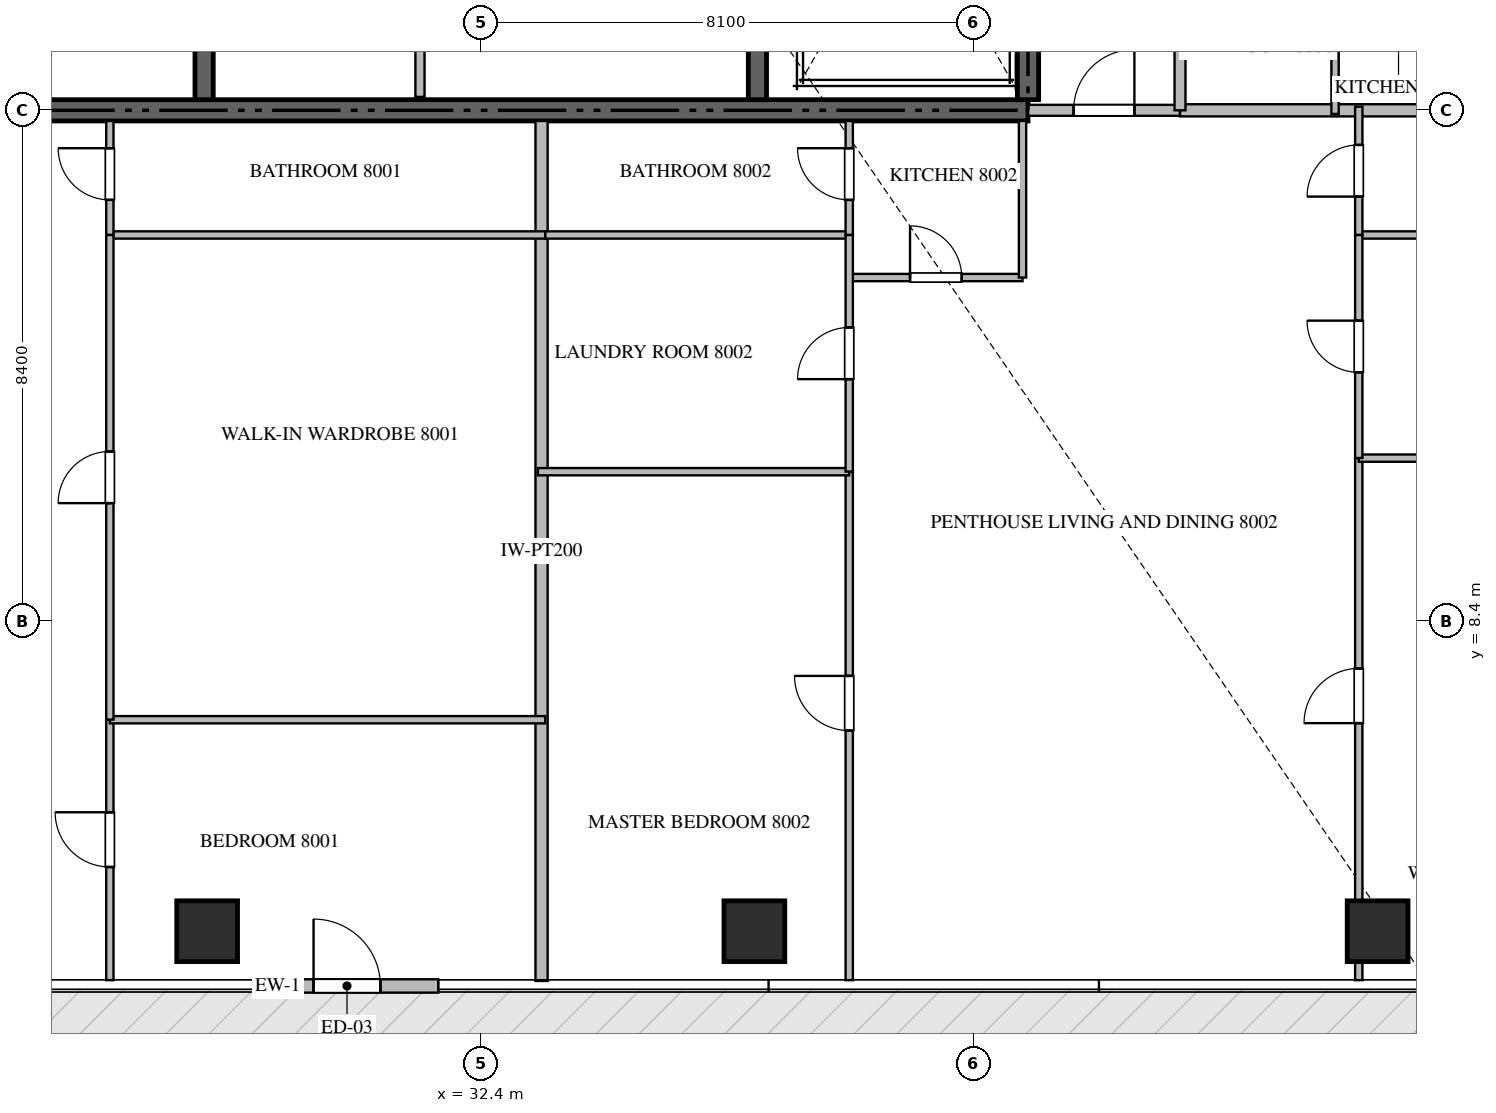
"""IFC4 building model, lengths in metres.
Left out: names, types, materials, properties, quantities, classifications, styles, units other than length and angle.
Written with IfcOpenShell. Run it as: python <this file> out.ifc"""

import sys

from ifc_helpers import new_model, si_unit, direction, frame, frame_2d, origin, origin_2d, place, context, subcontext, project, spatial, rectangle, extrude, source, transform, mapped, element, fill, save


model = new_model("IFC4")
c1 = context("Model", 3, precision=1e-05, world=origin(), true_north=direction((0.0, 1.0)))
c2 = subcontext(c1, "Body", "Model", "MODEL_VIEW")
j1 = project(units=[si_unit("LENGTHUNIT", "METRE"), si_unit("PLANEANGLEUNIT", "RADIAN")], contexts=[c1])
p1 = place(None, origin())
s1 = spatial("IfcSite", under=j1, at=p1, CompositionType="ELEMENT")
p2 = place(p1, origin())
s2 = spatial("IfcBuilding", under=s1, at=p2, CompositionType="ELEMENT")
p3 = place(p2, frame((0.0, 0.0, 321.8)))
s3 = spatial("IfcBuildingStorey", under=s2, at=p3, CompositionType="ELEMENT", Elevation=321.8)
p4 = place(p3, frame((23.4, 16.8, -0.26), z_axis=(0.0, 0.0, 1.0), x_axis=(1.0, 0.0, 0.0)))
e1 = element("IfcWall", 1, at=p4, inside=s3, PredefinedType="SHEAR", context=c2, shape_type="SweptSolid", body=[
    extrude(rectangle(XDim=18.0, YDim=0.35, at=frame_2d((9.0, 0.0))), origin(), (0.0, 0.0, 1.0), 4.048),
])
p5 = place(p3, frame((41.4, 16.975, -0.26), z_axis=(0.0, 0.0, 1.0), x_axis=(0.0, 1.0, 0.0)))
e2 = element("IfcWall", 2, at=p5, inside=s3, PredefinedType="SHEAR", context=c2, shape_type="SweptSolid", body=[
    extrude(rectangle(XDim=8.375, YDim=0.35, at=frame_2d((4.188, 0.0))), origin(), (0.0, 0.0, 1.0), 4.048),
])
p6 = place(p3, frame((27.85, 16.975, -0.26), z_axis=(0.0, 0.0, 1.0), x_axis=(0.0, 1.0, 0.0)))
e3 = element("IfcWall", 3, at=p6, inside=s3, PredefinedType="SHEAR", context=c2, shape_type="SweptSolid", body=[
    extrude(rectangle(XDim=4.875, YDim=0.3, at=frame_2d((2.438, 0.0))), origin(), (0.0, 0.0, 1.0), 4.048),
])
p7 = place(p3, frame((36.95, 16.975, -0.26), z_axis=(0.0, 0.0, 1.0), x_axis=(0.0, 1.0, 0.0)))
e4 = element("IfcWall", 4, at=p7, inside=s3, PredefinedType="SHEAR", context=c2, shape_type="SweptSolid", body=[
    extrude(rectangle(XDim=8.375, YDim=0.3, at=frame_2d((4.188, 0.0))), origin(), (0.0, 0.0, 1.0), 4.048),
])
m1 = source(origin(), c2, "Body", "SweptSolid", [
    extrude(rectangle(XDim=1.0, YDim=1.0, at=origin_2d()), origin(), (0.0, 0.0, 1.0), 4.05),
])
for number, where, z_axis, x_axis in (
    (5, (27.9, 3.3, -0.26), (0.0, 0.0, 1.0), (1.0, 0.0, 0.0)),
    (6, (36.9, 3.3, -0.26), (0.0, 0.0, 1.0), (1.0, 0.0, 0.0)),
    (7, (47.15, 3.3, -0.26), (0.0, 0.0, 1.0), (1.0, 0.0, 0.0)),
):
    element("IfcColumn", number, at=place(p3, frame(where, z_axis=z_axis, x_axis=x_axis)), inside=s3, PredefinedType="COLUMN", context=c2, shape_type="MappedRepresentation", body=[
        mapped(m1, transform((0.0, 0.0, 0.0), scale=1.0)),
    ])
p8 = place(p3, frame((28.7, 2.4, 0.0), z_axis=(0.0, 0.0, 1.0), x_axis=(1.0, 0.0, 0.0)))
e8 = element("IfcWall", 8, at=p8, inside=s3, PredefinedType="ELEMENTEDWALL", context=c2, shape_type="SweptSolid", body=[
    extrude(rectangle(XDim=3.0, YDim=0.22, at=frame_2d((1.5, 0.0))), origin(), (0.0, 0.0, 1.0), 3.775),
])
p9 = place(p8, frame((0.95, 0.0, 0.0)))
e9 = element("IfcOpeningElement", 9, at=p9, cuts=e8, PredefinedType="OPENING", context=c2, shape_type="SweptSolid", body=[
    extrude(rectangle(XDim=1.1, YDim=2.2, at=frame_2d((0.55, 1.1))), frame((0.0, 0.12, 0.0), z_axis=(0.0, -1.0, 0.0), x_axis=(1.0, 0.0, 0.0)), (0.0, 0.0, 1.0), 0.24),
])
p10 = place(p3, frame((31.4, 17.02, 0.0), z_axis=(0.0, 0.0, 1.0), x_axis=(0.0, 1.0, 0.0)))
e10 = element("IfcWall", 10, at=p10, inside=s3, PredefinedType="PARTITIONING", context=c2, shape_type="SweptSolid", body=[
    extrude(rectangle(XDim=2.73, YDim=0.15, at=frame_2d((1.365, 0.0))), origin(), (0.0, 0.0, 1.0), 3.79),
])
p11 = place(p3, frame((33.4, 2.482, 0.0), z_axis=(0.0, 0.0, 1.0), x_axis=(0.0, 1.0, 0.0)))
e11 = element("IfcWall", 11, at=p11, inside=s3, PredefinedType="PARTITIONING", context=c2, shape_type="SweptSolid", body=[
    extrude(rectangle(XDim=14.143, YDim=0.2, at=frame_2d((7.072, 0.0))), origin(), (0.0, 0.0, 1.0), 3.79),
])
p12 = place(p3, frame((43.9, 16.8, 0.0), z_axis=(0.0, 0.0, 1.0), x_axis=(1.0, 0.0, 0.0)))
e12 = element("IfcWall", 12, at=p12, inside=s3, PredefinedType="PARTITIONING", context=c2, shape_type="SweptSolid", body=[
    extrude(rectangle(XDim=11.618, YDim=0.2, at=frame_2d((5.809, 0.0))), origin(), (0.0, 0.0, 1.0), 3.79),
])
p13 = place(p3, frame((41.402, 16.8, 0.0), z_axis=(0.0, 0.0, 1.0), x_axis=(1.0, 0.0, 0.0)))
e13 = element("IfcWall", 13, at=p13, inside=s3, PredefinedType="PARTITIONING", context=c2, shape_type="SweptSolid", body=[
    extrude(rectangle(XDim=2.496, YDim=0.18, at=frame_2d((1.248, 0.0))), origin(), (0.0, 0.0, 1.0), 3.79),
])
p14 = place(p13, frame((0.748, 0.0, 0.0)))
e14 = element("IfcOpeningElement", 14, at=p14, cuts=e13, PredefinedType="OPENING", context=c2, shape_type="SweptSolid", body=[
    extrude(rectangle(XDim=1.0, YDim=2.15, at=frame_2d((0.5, 1.075))), frame((0.0, 0.1, 0.0), z_axis=(0.0, -1.0, 0.0), x_axis=(1.0, 0.0, 0.0)), (0.0, 0.0, 1.0), 0.2),
])
p15 = place(p3, frame((43.9, 16.8, 0.0), z_axis=(0.0, 0.0, 1.0), x_axis=(0.0, 1.0, 0.0)))
e15 = element("IfcWall", 15, at=p15, inside=s3, PredefinedType="PARTITIONING", context=c2, shape_type="SweptSolid", body=[
    extrude(rectangle(XDim=16.8, YDim=0.18, at=frame_2d((8.4, 0.0))), origin(), (0.0, 0.0, 1.0), 3.79),
])
p16 = place(p15, frame((4.803, 0.0, 0.0)))
e16 = element("IfcOpeningElement", 16, at=p16, cuts=e15, PredefinedType="OPENING", context=c2, shape_type="SweptSolid", body=[
    extrude(rectangle(XDim=1.0, YDim=2.15, at=frame_2d((0.5, 1.075))), frame((0.0, 0.1, 0.0), z_axis=(0.0, -1.0, 0.0), x_axis=(1.0, 0.0, 0.0)), (0.0, 0.0, 1.0), 0.2),
])
p17 = place(p15, frame((13.225, 0.0, 0.0)))
e17 = element("IfcOpeningElement", 17, at=p17, cuts=e15, PredefinedType="OPENING", context=c2, shape_type="SweptSolid", body=[
    extrude(rectangle(XDim=1.0, YDim=2.15, at=frame_2d((0.5, 1.075))), frame((0.0, 0.1, 0.0), z_axis=(0.0, -1.0, 0.0), x_axis=(1.0, 0.0, 0.0)), (0.0, 0.0, 1.0), 0.2),
])
p18 = place(p3, frame((26.3, 2.495, 0.0), z_axis=(0.0, 0.0, 1.0), x_axis=(0.0, 1.0, 0.0)))
e18 = element("IfcWall", 18, at=p18, inside=s3, PredefinedType="PARTITIONING", context=c2, shape_type="SweptSolid", body=[
    extrude(rectangle(XDim=4.283, YDim=0.12, at=frame_2d((2.142, 0.0))), origin(), (0.0, 0.0, 1.0), 3.79),
])
p19 = place(p18, frame((1.861, 0.0, 0.0)))
e19 = element("IfcOpeningElement", 19, at=p19, cuts=e18, PredefinedType="OPENING", context=c2, shape_type="SweptSolid", body=[
    extrude(rectangle(XDim=0.9, YDim=2.1, at=frame_2d((0.45, 1.05))), frame((0.0, 0.07, 0.0), z_axis=(0.0, -1.0, 0.0), x_axis=(1.0, 0.0, 0.0)), (0.0, 0.0, 1.0), 0.14),
])
for number, where, z_axis, x_axis in (
    (20, (26.3, 6.778, 0.0), (0.0, 0.0, 1.0), (1.0, 0.0, 0.0)),
    (21, (26.3, 14.75, 0.0), (0.0, 0.0, 1.0), (1.0, 0.0, 0.0)),
):
    element("IfcWall", number, at=place(p3, frame(where, z_axis=z_axis, x_axis=x_axis)), inside=s3, PredefinedType="PARTITIONING", context=c2, shape_type="SweptSolid", body=[
        extrude(rectangle(XDim=7.16, YDim=0.12, at=frame_2d((3.58, 0.0))), origin(), (0.0, 0.0, 1.0), 3.79),
    ])
p20 = place(p3, frame((26.3, 6.78, 0.0), z_axis=(0.0, 0.0, 1.0), x_axis=(0.0, 1.0, 0.0)))
e22 = element("IfcWall", 22, at=p20, inside=s3, PredefinedType="PARTITIONING", context=c2, shape_type="SweptSolid", body=[
    extrude(rectangle(XDim=7.97, YDim=0.12, at=frame_2d((3.985, 0.0))), origin(), (0.0, 0.0, 1.0), 3.79),
])
p21 = place(p20, frame((3.56, 0.0, 0.0)))
e23 = element("IfcOpeningElement", 23, at=p21, cuts=e22, PredefinedType="OPENING", context=c2, shape_type="SweptSolid", body=[
    extrude(rectangle(XDim=0.85, YDim=2.1, at=frame_2d((0.425, 1.05))), frame((0.0, 0.07, 0.0), z_axis=(0.0, -1.0, 0.0), x_axis=(1.0, 0.0, 0.0)), (0.0, 0.0, 1.0), 0.14),
])
p22 = place(p3, frame((26.3, 14.752, 0.0), z_axis=(0.0, 0.0, 1.0), x_axis=(0.0, 1.0, 0.0)))
e24 = element("IfcWall", 24, at=p22, inside=s3, PredefinedType="PARTITIONING", context=c2, shape_type="SweptSolid", body=[
    extrude(rectangle(XDim=1.873, YDim=0.12, at=frame_2d((0.937, 0.0))), origin(), (0.0, 0.0, 1.0), 3.79),
])
p23 = place(p22, frame((0.575, 0.0, 0.0)))
e25 = element("IfcOpeningElement", 25, at=p23, cuts=e24, PredefinedType="OPENING", context=c2, shape_type="SweptSolid", body=[
    extrude(rectangle(XDim=0.85, YDim=2.1, at=frame_2d((0.425, 1.05))), frame((0.0, 0.07, 0.0), z_axis=(0.0, -1.0, 0.0), x_axis=(1.0, 0.0, 0.0)), (0.0, 0.0, 1.0), 0.14),
])
p24 = place(p3, frame((38.46, 14.05, 0.0), z_axis=(0.0, 0.0, 1.0), x_axis=(1.0, 0.0, 0.0)))
e26 = element("IfcWall", 26, at=p24, inside=s3, PredefinedType="PARTITIONING", context=c2, shape_type="SweptSolid", body=[
    extrude(rectangle(XDim=2.85, YDim=0.12, at=frame_2d((1.425, 0.0))), origin(), (0.0, 0.0, 1.0), 3.79),
])
p25 = place(p24, frame((1.0, 0.0, 0.0)))
e27 = element("IfcOpeningElement", 27, at=p25, cuts=e26, PredefinedType="OPENING", context=c2, shape_type="SweptSolid", body=[
    extrude(rectangle(XDim=0.85, YDim=2.1, at=frame_2d((0.425, 1.05))), frame((0.0, 0.07, 0.0), z_axis=(0.0, -1.0, 0.0), x_axis=(1.0, 0.0, 0.0)), (0.0, 0.0, 1.0), 0.14),
])
p26 = place(p3, frame((41.31, 14.05, 0.0), z_axis=(0.0, 0.0, 1.0), x_axis=(0.0, 1.0, 0.0)))
e28 = element("IfcWall", 28, at=p26, inside=s3, PredefinedType="PARTITIONING", context=c2, shape_type="SweptSolid", body=[
    extrude(rectangle(XDim=2.575, YDim=0.12, at=frame_2d((1.288, 0.0))), origin(), (0.0, 0.0, 1.0), 3.79),
])
p27 = place(p3, frame((38.46, 2.495, 0.0), z_axis=(0.0, 0.0, 1.0), x_axis=(0.0, 1.0, 0.0)))
e29 = element("IfcWall", 29, at=p27, inside=s3, PredefinedType="PARTITIONING", context=c2, shape_type="SweptSolid", body=[
    extrude(rectangle(XDim=8.362, YDim=0.12, at=frame_2d((4.181, 0.0))), origin(), (0.0, 0.0, 1.0), 3.79),
])
p28 = place(p27, frame((4.104, 0.0, 0.0)))
e30 = element("IfcOpeningElement", 30, at=p28, cuts=e29, PredefinedType="OPENING", context=c2, shape_type="SweptSolid", body=[
    extrude(rectangle(XDim=0.9, YDim=2.1, at=frame_2d((0.45, 1.05))), frame((0.0, 0.07, 0.0), z_axis=(0.0, -1.0, 0.0), x_axis=(1.0, 0.0, 0.0)), (0.0, 0.0, 1.0), 0.14),
])
p29 = place(p3, frame((33.34, 10.857, 0.0), z_axis=(0.0, 0.0, 1.0), x_axis=(1.0, 0.0, 0.0)))
e31 = element("IfcWall", 31, at=p29, inside=s3, PredefinedType="PARTITIONING", context=c2, shape_type="SweptSolid", body=[
    extrude(rectangle(XDim=5.12, YDim=0.12, at=frame_2d((2.56, 0.0))), origin(), (0.0, 0.0, 1.0), 3.372),
])
p30 = place(p3, frame((33.462, 14.75, 0.0), z_axis=(0.0, 0.0, 1.0), x_axis=(1.0, 0.0, 0.0)))
e32 = element("IfcWall", 32, at=p30, inside=s3, PredefinedType="PARTITIONING", context=c2, shape_type="SweptSolid", body=[
    extrude(rectangle(XDim=4.998, YDim=0.12, at=frame_2d((2.499, 0.0))), origin(), (0.0, 0.0, 1.0), 3.79),
])
p31 = place(p3, frame((38.46, 10.859, 0.0), z_axis=(0.0, 0.0, 1.0), x_axis=(0.0, 1.0, 0.0)))
e33 = element("IfcWall", 33, at=p31, inside=s3, PredefinedType="PARTITIONING", context=c2, shape_type="SweptSolid", body=[
    extrude(rectangle(XDim=3.891, YDim=0.12, at=frame_2d((1.946, 0.0))), origin(), (0.0, 0.0, 1.0), 3.79),
])
p32 = place(p31, frame((1.52, 0.0, 0.0)))
e34 = element("IfcOpeningElement", 34, at=p32, cuts=e33, PredefinedType="OPENING", context=c2, shape_type="SweptSolid", body=[
    extrude(rectangle(XDim=0.85, YDim=2.1, at=frame_2d((0.425, 1.05))), frame((0.0, 0.07, 0.0), z_axis=(0.0, -1.0, 0.0), x_axis=(1.0, 0.0, 0.0)), (0.0, 0.0, 1.0), 0.14),
])
p33 = place(p3, frame((38.46, 14.752, 0.0), z_axis=(0.0, 0.0, 1.0), x_axis=(0.0, 1.0, 0.0)))
e35 = element("IfcWall", 35, at=p33, inside=s3, PredefinedType="PARTITIONING", context=c2, shape_type="SweptSolid", body=[
    extrude(rectangle(XDim=1.873, YDim=0.12, at=frame_2d((0.937, 0.0))), origin(), (0.0, 0.0, 1.0), 3.79),
])
p34 = place(p33, frame((0.575, 0.0, 0.0)))
e36 = element("IfcOpeningElement", 36, at=p34, cuts=e35, PredefinedType="OPENING", context=c2, shape_type="SweptSolid", body=[
    extrude(rectangle(XDim=0.85, YDim=2.1, at=frame_2d((0.425, 1.05))), frame((0.0, 0.07, 0.0), z_axis=(0.0, -1.0, 0.0), x_axis=(1.0, 0.0, 0.0)), (0.0, 0.0, 1.0), 0.14),
])
p35 = place(p3, frame((46.84, 2.495, 0.0), z_axis=(0.0, 0.0, 1.0), x_axis=(0.0, 1.0, 0.0)))
e37 = element("IfcWall", 37, at=p35, inside=s3, PredefinedType="PARTITIONING", context=c2, shape_type="SweptSolid", body=[
    extrude(rectangle(XDim=8.585, YDim=0.12, at=frame_2d((4.292, 0.0))), origin(), (0.0, 0.0, 1.0), 3.79),
])
p36 = place(p35, frame((4.227, 0.0, 0.0)))
e38 = element("IfcOpeningElement", 38, at=p36, cuts=e37, PredefinedType="OPENING", context=c2, shape_type="SweptSolid", body=[
    extrude(rectangle(XDim=0.9, YDim=2.1, at=frame_2d((0.45, 1.05))), frame((0.0, 0.07, 0.0), z_axis=(0.0, -1.0, 0.0), x_axis=(1.0, 0.0, 0.0)), (0.0, 0.0, 1.0), 0.14),
])
p37 = place(p3, frame((46.84, 11.08, 0.0), z_axis=(0.0, 0.0, 1.0), x_axis=(1.0, 0.0, 0.0)))
e39 = element("IfcWall", 39, at=p37, inside=s3, PredefinedType="PARTITIONING", context=c2, shape_type="SweptSolid", body=[
    extrude(rectangle(XDim=8.665, YDim=0.12, at=frame_2d((4.333, 0.0))), origin(), (0.0, 0.0, 1.0), 3.372),
])
p38 = place(p3, frame((46.84, 14.75, 0.0), z_axis=(0.0, 0.0, 1.0), x_axis=(1.0, 0.0, 0.0)))
e40 = element("IfcWall", 40, at=p38, inside=s3, PredefinedType="PARTITIONING", context=c2, shape_type="SweptSolid", body=[
    extrude(rectangle(XDim=8.665, YDim=0.12, at=frame_2d((4.333, 0.0))), origin(), (0.0, 0.0, 1.0), 3.79),
])
p39 = place(p3, frame((46.84, 11.082, 0.0), z_axis=(0.0, 0.0, 1.0), x_axis=(0.0, 1.0, 0.0)))
e41 = element("IfcWall", 41, at=p39, inside=s3, PredefinedType="PARTITIONING", context=c2, shape_type="SweptSolid", body=[
    extrude(rectangle(XDim=3.668, YDim=0.12, at=frame_2d((1.834, 0.0))), origin(), (0.0, 0.0, 1.0), 3.79),
])
p40 = place(p39, frame((1.409, 0.0, 0.0)))
e42 = element("IfcOpeningElement", 42, at=p40, cuts=e41, PredefinedType="OPENING", context=c2, shape_type="SweptSolid", body=[
    extrude(rectangle(XDim=0.85, YDim=2.1, at=frame_2d((0.425, 1.05))), frame((0.0, 0.07, 0.0), z_axis=(0.0, -1.0, 0.0), x_axis=(1.0, 0.0, 0.0)), (0.0, 0.0, 1.0), 0.14),
])
p41 = place(p3, frame((46.84, 14.752, 0.0), z_axis=(0.0, 0.0, 1.0), x_axis=(0.0, 1.0, 0.0)))
e43 = element("IfcWall", 43, at=p41, inside=s3, PredefinedType="PARTITIONING", context=c2, shape_type="SweptSolid", body=[
    extrude(rectangle(XDim=2.108, YDim=0.12, at=frame_2d((1.054, 0.0))), origin(), (0.0, 0.0, 1.0), 3.79),
])
p42 = place(p41, frame((0.629, 0.0, 0.0)))
e44 = element("IfcOpeningElement", 44, at=p42, cuts=e43, PredefinedType="OPENING", context=c2, shape_type="SweptSolid", body=[
    extrude(rectangle(XDim=0.85, YDim=2.1, at=frame_2d((0.425, 1.05))), frame((0.0, 0.07, 0.0), z_axis=(0.0, -1.0, 0.0), x_axis=(1.0, 0.0, 0.0)), (0.0, 0.0, 1.0), 0.14),
])
p43 = place(p3, frame((46.45, 16.74, 0.0), z_axis=(0.0, 0.0, 1.0), x_axis=(0.0, 1.0, 0.0)))
e45 = element("IfcWall", 45, at=p43, inside=s3, PredefinedType="PARTITIONING", context=c2, shape_type="SweptSolid", body=[
    extrude(rectangle(XDim=2.66, YDim=0.12, at=frame_2d((1.33, 0.0))), origin(), (0.0, 0.0, 1.0), 3.79),
])
m2 = source(origin(), c2, "Body", "SweptSolid", [
    extrude(rectangle(XDim=1.1, YDim=2.2, at=frame_2d((0.55, 1.1))), frame((0.0, 0.025, 0.0), z_axis=(0.0, -1.0, 0.0), x_axis=(1.0, 0.0, 0.0)), (0.0, 0.0, 1.0), 0.05),
])
p44 = place(p9, origin())
e46 = element("IfcDoor", 46, at=p44, inside=s3, OperationType="SINGLE_SWING_LEFT", PredefinedType="DOOR", context=c2, shape_type="MappedRepresentation", body=[
    mapped(m2, transform((0.0, 0.0, 0.0), scale=1.0)),
])
fill(e9, e46)
m3 = source(origin(), c2, "Body", "SweptSolid", [
    extrude(rectangle(XDim=1.0, YDim=2.15, at=frame_2d((0.5, 1.075))), frame((0.0, 0.025, 0.0), z_axis=(0.0, -1.0, 0.0), x_axis=(1.0, 0.0, 0.0)), (0.0, 0.0, 1.0), 0.05),
])
p45 = place(p14, origin())
e47 = element("IfcDoor", 47, at=p45, inside=s3, OperationType="SINGLE_SWING_RIGHT", PredefinedType="DOOR", context=c2, shape_type="MappedRepresentation", body=[
    mapped(m3, transform((0.0, 0.0, 0.0), scale=1.0)),
])
fill(e14, e47)
m4 = source(origin(), c2, "Body", "SweptSolid", [
    extrude(rectangle(XDim=0.9, YDim=2.1, at=frame_2d((0.45, 1.05))), frame((0.0, 0.025, 0.0), z_axis=(0.0, -1.0, 0.0), x_axis=(1.0, 0.0, 0.0)), (0.0, 0.0, 1.0), 0.05),
])
p46 = place(p19, origin())
e48 = element("IfcDoor", 48, at=p46, inside=s3, OperationType="SINGLE_SWING_RIGHT", PredefinedType="DOOR", context=c2, shape_type="MappedRepresentation", body=[
    mapped(m4, transform((0.0, 0.0, 0.0), scale=1.0)),
])
fill(e19, e48)
m5 = source(origin(), c2, "Body", "SweptSolid", [
    extrude(rectangle(XDim=0.85, YDim=2.1, at=frame_2d((0.425, 1.05))), frame((0.0, 0.025, 0.0), z_axis=(0.0, -1.0, 0.0), x_axis=(1.0, 0.0, 0.0)), (0.0, 0.0, 1.0), 0.05),
])
p47 = place(p21, origin())
e49 = element("IfcDoor", 49, at=p47, inside=s3, OperationType="SINGLE_SWING_LEFT", PredefinedType="DOOR", context=c2, shape_type="MappedRepresentation", body=[
    mapped(m5, transform((0.0, 0.0, 0.0), scale=1.0)),
])
fill(e23, e49)
p48 = place(p23, origin())
e50 = element("IfcDoor", 50, at=p48, inside=s3, OperationType="SINGLE_SWING_RIGHT", PredefinedType="DOOR", context=c2, shape_type="MappedRepresentation", body=[
    mapped(m5, transform((0.0, 0.0, 0.0), scale=1.0)),
])
fill(e25, e50)
p49 = place(p25, origin())
e51 = element("IfcDoor", 51, at=p49, inside=s3, OperationType="SINGLE_SWING_LEFT", PredefinedType="DOOR", context=c2, shape_type="MappedRepresentation", body=[
    mapped(m5, transform((0.0, 0.0, 0.0), scale=1.0)),
])
fill(e27, e51)
p50 = place(p28, origin())
e52 = element("IfcDoor", 52, at=p50, inside=s3, OperationType="SINGLE_SWING_RIGHT", PredefinedType="DOOR", context=c2, shape_type="MappedRepresentation", body=[
    mapped(m4, transform((0.0, 0.0, 0.0), scale=1.0)),
])
fill(e30, e52)
p51 = place(p32, origin())
e53 = element("IfcDoor", 53, at=p51, inside=s3, OperationType="SINGLE_SWING_LEFT", PredefinedType="DOOR", context=c2, shape_type="MappedRepresentation", body=[
    mapped(m5, transform((0.0, 0.0, 0.0), scale=1.0)),
])
fill(e34, e53)
p52 = place(p34, origin())
e54 = element("IfcDoor", 54, at=p52, inside=s3, OperationType="SINGLE_SWING_RIGHT", PredefinedType="DOOR", context=c2, shape_type="MappedRepresentation", body=[
    mapped(m5, transform((0.0, 0.0, 0.0), scale=1.0)),
])
fill(e36, e54)
p53 = place(p36, origin())
e55 = element("IfcDoor", 55, at=p53, inside=s3, OperationType="SINGLE_SWING_LEFT", PredefinedType="DOOR", context=c2, shape_type="MappedRepresentation", body=[
    mapped(m4, transform((0.0, 0.0, 0.0), scale=1.0)),
])
fill(e38, e55)
p54 = place(p40, origin())
e56 = element("IfcDoor", 56, at=p54, inside=s3, OperationType="SINGLE_SWING_RIGHT", PredefinedType="DOOR", context=c2, shape_type="MappedRepresentation", body=[
    mapped(m5, transform((0.0, 0.0, 0.0), scale=1.0)),
])
fill(e42, e56)
p55 = place(p42, origin())
e57 = element("IfcDoor", 57, at=p55, inside=s3, OperationType="SINGLE_SWING_LEFT", PredefinedType="DOOR", context=c2, shape_type="MappedRepresentation", body=[
    mapped(m5, transform((0.0, 0.0, 0.0), scale=1.0)),
])
fill(e44, e57)
save(model, sys.argv[1])
